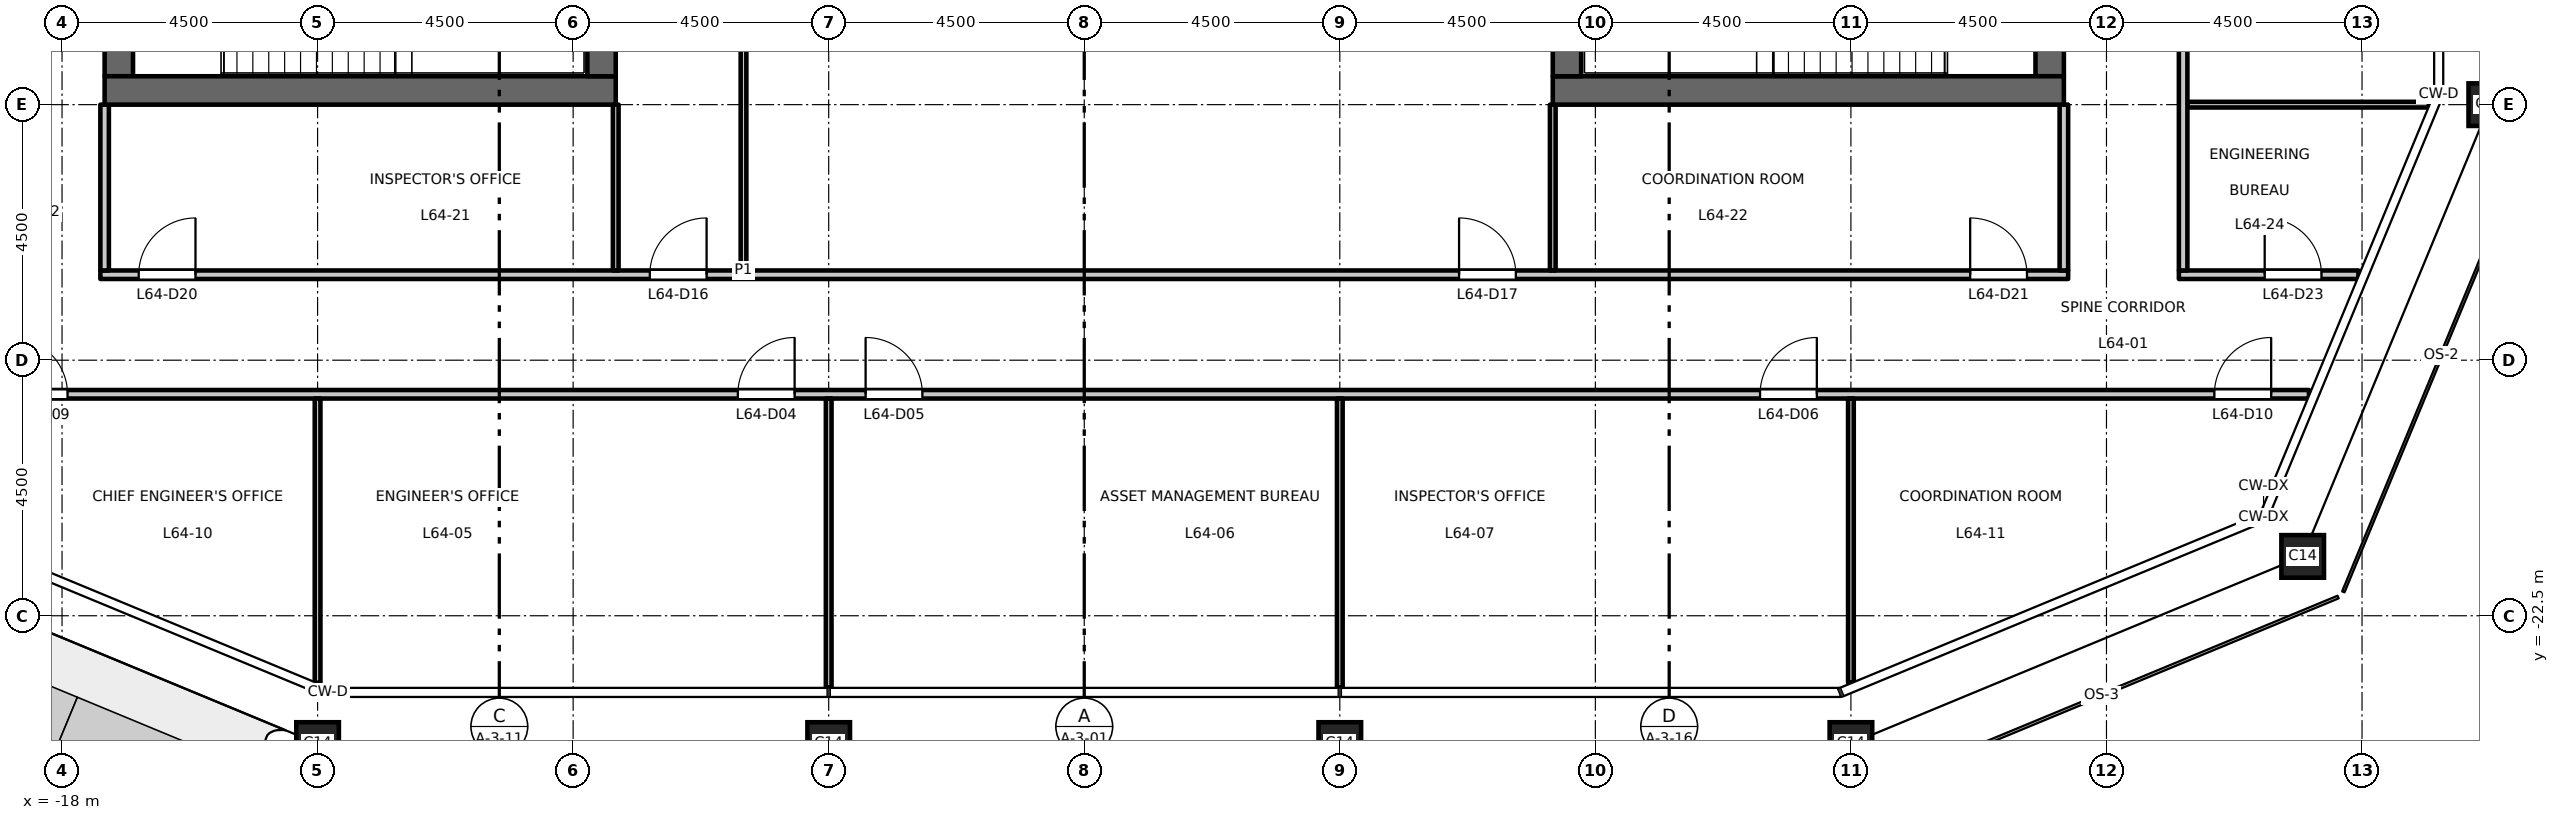
"""IFC4 building model, lengths in metres.
Left out: names, types, materials, properties, quantities, classifications, styles, units other than length and angle.
Written with IfcOpenShell. Run it as: python <this file> out.ifc"""

import sys

from ifc_helpers import new_model, si_unit, direction, frame, frame_2d, origin, origin_2d, place, context, subcontext, project, spatial, rectangle, hollow_rectangle, extrude, element, fill, save


model = new_model("IFC4")
c1 = context("Model", 3, precision=1e-05, world=origin(), true_north=direction((0.0, 1.0)))
c2 = subcontext(c1, "Body", "Model", "MODEL_VIEW")
j1 = project(units=[si_unit("LENGTHUNIT", "METRE"), si_unit("PLANEANGLEUNIT", "RADIAN")], contexts=[c1])
p1 = place(None, origin())
s1 = spatial("IfcSite", under=j1, at=p1, CompositionType="ELEMENT")
p2 = place(p1, origin())
s2 = spatial("IfcBuilding", under=s1, at=p2, CompositionType="ELEMENT")
p3 = place(p2, frame((0.0, 0.0, 298.7)))
s3 = spatial("IfcBuildingStorey", under=s2, at=p3, CompositionType="ELEMENT", Elevation=298.7)
for number, where, z_axis, x_axis in (
    (1, (-13.5, -24.75, 0.0), (0.0, 0.0, 1.0), (1.0, 0.0, 0.0)),
    (2, (-4.5, -24.75, 0.0), (0.0, 0.0, 1.0), (1.0, 0.0, 0.0)),
    (3, (4.5, -24.75, 0.0), (0.0, 0.0, 1.0), (1.0, 0.0, 0.0)),
    (4, (13.5, -24.75, 0.0), (0.0, 0.0, 1.0), (1.0, 0.0, 0.0)),
    (5, (21.455, -21.455, 0.0), (0.0, 0.0, 1.0), (1.0, 0.0, 0.0)),
    (6, (24.75, -13.5, 0.0), (0.0, 0.0, 1.0), (1.0, 0.0, 0.0)),
):
    element("IfcColumn", number, at=place(p3, frame(where, z_axis=z_axis, x_axis=x_axis)), inside=s3, PredefinedType="COLUMN", context=c2, shape_type="SweptSolid", body=[
        extrude(hollow_rectangle(XDim=0.75, YDim=0.75, WallThickness=0.04, at=origin_2d()), origin(), (0.0, 0.0, 1.0), 4.5),
    ])
p4 = place(p3, frame((-17.0, -13.0, 0.0), z_axis=(0.0, 0.0, 1.0), x_axis=(0.0, 1.0, 0.0)))
e7 = element("IfcWall", 7, at=p4, inside=s3, PredefinedType="SHEAR", context=c2, shape_type="SweptSolid", body=[
    extrude(rectangle(XDim=26.0, YDim=0.5, at=frame_2d((13.0, 0.0))), origin(), (0.0, 0.0, 1.0), 4.35),
])
p5 = place(p4, frame((16.825, 0.0, 0.0)))
e8 = element("IfcOpeningElement", 8, at=p5, cuts=e7, PredefinedType="OPENING", context=c2, shape_type="SweptSolid", body=[
    extrude(rectangle(XDim=1.8, YDim=2.1, at=frame_2d((0.9, 1.05))), frame((0.0, 0.26, 0.0), z_axis=(0.0, -1.0, 0.0), x_axis=(1.0, 0.0, 0.0)), (0.0, 0.0, 1.0), 0.52),
])
p6 = place(p4, frame((7.375, 0.0, 0.0)))
e9 = element("IfcOpeningElement", 9, at=p6, cuts=e7, PredefinedType="OPENING", context=c2, shape_type="SweptSolid", body=[
    extrude(rectangle(XDim=1.8, YDim=2.1, at=frame_2d((0.9, 1.05))), frame((0.0, 0.26, 0.0), z_axis=(0.0, -1.0, 0.0), x_axis=(1.0, 0.0, 0.0)), (0.0, 0.0, 1.0), 0.52),
])
p7 = place(p3, frame((-8.25, -13.25, 0.0), z_axis=(0.0, 0.0, 1.0), x_axis=(-1.0, 0.0, 0.0)))
e10 = element("IfcWall", 10, at=p7, inside=s3, PredefinedType="SHEAR", context=c2, shape_type="SweptSolid", body=[
    extrude(rectangle(XDim=9.0, YDim=0.5, at=frame_2d((4.5, 0.0))), origin(), (0.0, 0.0, 1.0), 4.35),
])
p8 = place(p3, frame((-8.5, -13.0, 0.0), z_axis=(0.0, 0.0, 1.0), x_axis=(0.0, 1.0, 0.0)))
e11 = element("IfcWall", 11, at=p8, inside=s3, PredefinedType="SHEAR", context=c2, shape_type="SweptSolid", body=[
    extrude(rectangle(XDim=26.0, YDim=0.5, at=frame_2d((13.0, 0.0))), origin(), (0.0, 0.0, 1.0), 4.35),
])
p9 = place(p3, frame((17.0, -13.0, 0.0), z_axis=(0.0, 0.0, 1.0), x_axis=(0.0, 1.0, 0.0)))
e12 = element("IfcWall", 12, at=p9, inside=s3, PredefinedType="SHEAR", context=c2, shape_type="SweptSolid", body=[
    extrude(rectangle(XDim=26.0, YDim=0.5, at=frame_2d((13.0, 0.0))), origin(), (0.0, 0.0, 1.0), 4.35),
])
p10 = place(p9, frame((16.825, 0.0, 0.0)))
e13 = element("IfcOpeningElement", 13, at=p10, cuts=e12, PredefinedType="OPENING", context=c2, shape_type="SweptSolid", body=[
    extrude(rectangle(XDim=1.8, YDim=2.1, at=frame_2d((0.9, 1.05))), frame((0.0, 0.26, 0.0), z_axis=(0.0, -1.0, 0.0), x_axis=(1.0, 0.0, 0.0)), (0.0, 0.0, 1.0), 0.52),
])
p11 = place(p9, frame((7.375, 0.0, 0.0)))
e14 = element("IfcOpeningElement", 14, at=p11, cuts=e12, PredefinedType="OPENING", context=c2, shape_type="SweptSolid", body=[
    extrude(rectangle(XDim=1.8, YDim=2.1, at=frame_2d((0.9, 1.05))), frame((0.0, 0.26, 0.0), z_axis=(0.0, -1.0, 0.0), x_axis=(1.0, 0.0, 0.0)), (0.0, 0.0, 1.0), 0.52),
])
p12 = place(p3, frame((8.25, -13.25, 0.0), z_axis=(0.0, 0.0, 1.0), x_axis=(1.0, 0.0, 0.0)))
e15 = element("IfcWall", 15, at=p12, inside=s3, PredefinedType="SHEAR", context=c2, shape_type="SweptSolid", body=[
    extrude(rectangle(XDim=9.0, YDim=0.5, at=frame_2d((4.5, 0.0))), origin(), (0.0, 0.0, 1.0), 4.35),
])
p13 = place(p3, frame((8.5, -13.0, 0.0), z_axis=(0.0, 0.0, 1.0), x_axis=(0.0, 1.0, 0.0)))
e16 = element("IfcWall", 16, at=p13, inside=s3, PredefinedType="SHEAR", context=c2, shape_type="SweptSolid", body=[
    extrude(rectangle(XDim=26.0, YDim=0.5, at=frame_2d((13.0, 0.0))), origin(), (0.0, 0.0, 1.0), 4.35),
])
p14 = place(p3, frame((-19.628, -18.6, 0.0), z_axis=(0.0, 0.0, 1.0), x_axis=(1.0, 0.0, 0.0)))
e17 = element("IfcWall", 17, at=p14, inside=s3, PredefinedType="PARTITIONING", context=c2, shape_type="SweptSolid", body=[
    extrude(rectangle(XDim=41.194, YDim=0.15, at=frame_2d((20.597, 0.0))), origin(), (0.0, 0.0, 1.0), 4.35),
])
p15 = place(p14, frame((13.528, 0.0, 0.0)))
e18 = element("IfcOpeningElement", 18, at=p15, cuts=e17, PredefinedType="OPENING", context=c2, shape_type="SweptSolid", body=[
    extrude(rectangle(XDim=1.0, YDim=2.1, at=frame_2d((0.5, 1.05))), frame((0.0, 0.085, 0.0), z_axis=(0.0, -1.0, 0.0), x_axis=(1.0, 0.0, 0.0)), (0.0, 0.0, 1.0), 0.17),
])
p16 = place(p14, frame((15.778, 0.0, 0.0)))
e19 = element("IfcOpeningElement", 19, at=p16, cuts=e17, PredefinedType="OPENING", context=c2, shape_type="SweptSolid", body=[
    extrude(rectangle(XDim=1.0, YDim=2.1, at=frame_2d((0.5, 1.05))), frame((0.0, 0.085, 0.0), z_axis=(0.0, -1.0, 0.0), x_axis=(1.0, 0.0, 0.0)), (0.0, 0.0, 1.0), 0.17),
])
p17 = place(p14, frame((31.528, 0.0, 0.0)))
e20 = element("IfcOpeningElement", 20, at=p17, cuts=e17, PredefinedType="OPENING", context=c2, shape_type="SweptSolid", body=[
    extrude(rectangle(XDim=1.0, YDim=2.1, at=frame_2d((0.5, 1.05))), frame((0.0, 0.085, 0.0), z_axis=(0.0, -1.0, 0.0), x_axis=(1.0, 0.0, 0.0)), (0.0, 0.0, 1.0), 0.17),
])
p18 = place(p14, frame((0.725, 0.0, 0.0)))
e21 = element("IfcOpeningElement", 21, at=p18, cuts=e17, PredefinedType="OPENING", context=c2, shape_type="SweptSolid", body=[
    extrude(rectangle(XDim=1.0, YDim=2.1, at=frame_2d((0.5, 1.05))), frame((0.0, 0.085, 0.0), z_axis=(0.0, -1.0, 0.0), x_axis=(1.0, 0.0, 0.0)), (0.0, 0.0, 1.0), 0.17),
])
p19 = place(p14, frame((39.528, 0.0, 0.0)))
e22 = element("IfcOpeningElement", 22, at=p19, cuts=e17, PredefinedType="OPENING", context=c2, shape_type="SweptSolid", body=[
    extrude(rectangle(XDim=1.0, YDim=2.1, at=frame_2d((0.5, 1.05))), frame((0.0, 0.085, 0.0), z_axis=(0.0, -1.0, 0.0), x_axis=(1.0, 0.0, 0.0)), (0.0, 0.0, 1.0), 0.17),
])
p20 = place(p3, frame((-17.325, -16.495, 0.0), z_axis=(0.0, 0.0, 1.0), x_axis=(1.0, 0.0, 0.0)))
e23 = element("IfcWall", 23, at=p20, inside=s3, PredefinedType="PARTITIONING", context=c2, shape_type="SweptSolid", body=[
    extrude(rectangle(XDim=34.65, YDim=0.15, at=frame_2d((17.325, 0.0))), origin(), (0.0, 0.0, 1.0), 4.35),
])
p21 = place(p20, frame((9.675, 0.0, 0.0)))
e24 = element("IfcOpeningElement", 24, at=p21, cuts=e23, PredefinedType="OPENING", context=c2, shape_type="SweptSolid", body=[
    extrude(rectangle(XDim=1.0, YDim=2.1, at=frame_2d((0.5, 1.05))), frame((0.0, 0.085, 0.0), z_axis=(0.0, -1.0, 0.0), x_axis=(1.0, 0.0, 0.0)), (0.0, 0.0, 1.0), 0.17),
])
p22 = place(p20, frame((23.925, 0.0, 0.0)))
e25 = element("IfcOpeningElement", 25, at=p22, cuts=e23, PredefinedType="OPENING", context=c2, shape_type="SweptSolid", body=[
    extrude(rectangle(XDim=1.0, YDim=2.1, at=frame_2d((0.5, 1.05))), frame((0.0, 0.085, 0.0), z_axis=(0.0, -1.0, 0.0), x_axis=(1.0, 0.0, 0.0)), (0.0, 0.0, 1.0), 0.17),
])
p23 = place(p20, frame((0.675, 0.0, 0.0)))
e26 = element("IfcOpeningElement", 26, at=p23, cuts=e23, PredefinedType="OPENING", context=c2, shape_type="SweptSolid", body=[
    extrude(rectangle(XDim=1.0, YDim=2.1, at=frame_2d((0.5, 1.05))), frame((0.0, 0.085, 0.0), z_axis=(0.0, -1.0, 0.0), x_axis=(1.0, 0.0, 0.0)), (0.0, 0.0, 1.0), 0.17),
])
p24 = place(p20, frame((32.925, 0.0, 0.0)))
e27 = element("IfcOpeningElement", 27, at=p24, cuts=e23, PredefinedType="OPENING", context=c2, shape_type="SweptSolid", body=[
    extrude(rectangle(XDim=1.0, YDim=2.1, at=frame_2d((0.5, 1.05))), frame((0.0, 0.085, 0.0), z_axis=(0.0, -1.0, 0.0), x_axis=(1.0, 0.0, 0.0)), (0.0, 0.0, 1.0), 0.17),
])
p25 = place(p3, frame((19.275, -16.495, 0.0), z_axis=(0.0, 0.0, 1.0), x_axis=(1.0, 0.0, 0.0)))
e28 = element("IfcWall", 28, at=p25, inside=s3, PredefinedType="PARTITIONING", context=c2, shape_type="SweptSolid", body=[
    extrude(rectangle(XDim=3.161, YDim=0.15, at=frame_2d((1.581, 0.0))), origin(), (0.0, 0.0, 1.0), 4.35),
])
p26 = place(p25, frame((1.511, 0.0, 0.0)))
e29 = element("IfcOpeningElement", 29, at=p26, cuts=e28, PredefinedType="OPENING", context=c2, shape_type="SweptSolid", body=[
    extrude(rectangle(XDim=1.0, YDim=2.1, at=frame_2d((0.5, 1.05))), frame((0.0, 0.085, 0.0), z_axis=(0.0, -1.0, 0.0), x_axis=(1.0, 0.0, 0.0)), (0.0, 0.0, 1.0), 0.17),
])
p27 = place(p3, frame((19.425, -13.5, 0.0), z_axis=(0.0, 0.0, 1.0), x_axis=(1.0, 0.0, 0.0)))
e30 = element("IfcWall", 30, at=p27, inside=s3, PredefinedType="PARTITIONING", context=c2, shape_type="SweptSolid", body=[
    extrude(rectangle(XDim=4.253, YDim=0.1, at=frame_2d((2.126, 0.0))), origin(), (0.0, 0.0, 1.0), 4.35),
])
p28 = place(p3, frame((-17.25, -16.42, 0.0), z_axis=(0.0, 0.0, 1.0), x_axis=(0.0, 1.0, 0.0)))
e31 = element("IfcWall", 31, at=p28, inside=s3, PredefinedType="PARTITIONING", context=c2, shape_type="SweptSolid", body=[
    extrude(rectangle(XDim=2.92, YDim=0.15, at=frame_2d((1.46, 0.0))), origin(), (0.0, 0.0, 1.0), 4.35),
])
p29 = place(p3, frame((-13.5, -23.678, 0.0), z_axis=(0.0, 0.0, 1.0), x_axis=(0.0, 1.0, 0.0)))
e32 = element("IfcWall", 32, at=p29, inside=s3, PredefinedType="PARTITIONING", context=c2, shape_type="SweptSolid", body=[
    extrude(rectangle(XDim=5.003, YDim=0.1, at=frame_2d((2.501, 0.0))), origin(), (0.0, 0.0, 1.0), 3.75),
])
p30 = place(p3, frame((-8.25, -16.42, 0.0), z_axis=(0.0, 0.0, 1.0), x_axis=(0.0, 1.0, 0.0)))
e33 = element("IfcWall", 33, at=p30, inside=s3, PredefinedType="PARTITIONING", context=c2, shape_type="SweptSolid", body=[
    extrude(rectangle(XDim=2.92, YDim=0.1, at=frame_2d((1.46, 0.0))), origin(), (0.0, 0.0, 1.0), 4.35),
])
p31 = place(p3, frame((-6.0, -16.42, 0.0), z_axis=(0.0, 0.0, 1.0), x_axis=(0.0, 1.0, 0.0)))
e34 = element("IfcWall", 34, at=p31, inside=s3, PredefinedType="PARTITIONING", context=c2, shape_type="SweptSolid", body=[
    extrude(rectangle(XDim=7.87, YDim=0.1, at=frame_2d((3.935, 0.0))), origin(), (0.0, 0.0, 1.0), 4.35),
])
for number, where, z_axis, x_axis in (
    (35, (-4.5, -23.76, 0.0), (0.0, 0.0, 1.0), (0.0, 1.0, 0.0)),
    (36, (4.5, -23.76, 0.0), (0.0, 0.0, 1.0), (0.0, 1.0, 0.0)),
):
    element("IfcWall", number, at=place(p3, frame(where, z_axis=z_axis, x_axis=x_axis)), inside=s3, PredefinedType="PARTITIONING", context=c2, shape_type="SweptSolid", body=[
        extrude(rectangle(XDim=5.085, YDim=0.1, at=frame_2d((2.542, 0.0))), origin(), (0.0, 0.0, 1.0), 3.65),
    ])
p32 = place(p3, frame((8.25, -16.42, 0.0), z_axis=(0.0, 0.0, 1.0), x_axis=(0.0, 1.0, 0.0)))
e37 = element("IfcWall", 37, at=p32, inside=s3, PredefinedType="PARTITIONING", context=c2, shape_type="SweptSolid", body=[
    extrude(rectangle(XDim=2.92, YDim=0.1, at=frame_2d((1.46, 0.0))), origin(), (0.0, 0.0, 1.0), 4.35),
])
p33 = place(p3, frame((13.5, -23.678, 0.0), z_axis=(0.0, 0.0, 1.0), x_axis=(0.0, 1.0, 0.0)))
e38 = element("IfcWall", 38, at=p33, inside=s3, PredefinedType="PARTITIONING", context=c2, shape_type="SweptSolid", body=[
    extrude(rectangle(XDim=5.003, YDim=0.1, at=frame_2d((2.501, 0.0))), origin(), (0.0, 0.0, 1.0), 3.75),
])
p34 = place(p3, frame((17.25, -16.42, 0.0), z_axis=(0.0, 0.0, 1.0), x_axis=(0.0, 1.0, 0.0)))
e39 = element("IfcWall", 39, at=p34, inside=s3, PredefinedType="PARTITIONING", context=c2, shape_type="SweptSolid", body=[
    extrude(rectangle(XDim=2.92, YDim=0.15, at=frame_2d((1.46, 0.0))), origin(), (0.0, 0.0, 1.0), 4.35),
])
p35 = place(p3, frame((19.35, -16.42, 0.0), z_axis=(0.0, 0.0, 1.0), x_axis=(0.0, 1.0, 0.0)))
e40 = element("IfcWall", 40, at=p35, inside=s3, PredefinedType="PARTITIONING", context=c2, shape_type="SweptSolid", body=[
    extrude(rectangle(XDim=32.845, YDim=0.15, at=frame_2d((16.422, 0.0))), origin(), (0.0, 0.0, 1.0), 4.35),
])
p36 = place(p35, frame((10.32, 0.0, 0.0)))
e41 = element("IfcOpeningElement", 41, at=p36, cuts=e40, PredefinedType="OPENING", context=c2, shape_type="SweptSolid", body=[
    extrude(rectangle(XDim=1.0, YDim=2.1, at=frame_2d((0.5, 1.05))), frame((0.0, 0.085, 0.0), z_axis=(0.0, -1.0, 0.0), x_axis=(1.0, 0.0, 0.0)), (0.0, 0.0, 1.0), 0.17),
])
p37 = place(p35, frame((12.57, 0.0, 0.0)))
e42 = element("IfcOpeningElement", 42, at=p37, cuts=e40, PredefinedType="OPENING", context=c2, shape_type="SweptSolid", body=[
    extrude(rectangle(XDim=1.0, YDim=2.1, at=frame_2d((0.5, 1.05))), frame((0.0, 0.085, 0.0), z_axis=(0.0, -1.0, 0.0), x_axis=(1.0, 0.0, 0.0)), (0.0, 0.0, 1.0), 0.17),
])
p38 = place(p35, frame((28.32, 0.0, 0.0)))
e43 = element("IfcOpeningElement", 43, at=p38, cuts=e40, PredefinedType="OPENING", context=c2, shape_type="SweptSolid", body=[
    extrude(rectangle(XDim=1.0, YDim=2.1, at=frame_2d((0.5, 1.05))), frame((0.0, 0.085, 0.0), z_axis=(0.0, -1.0, 0.0), x_axis=(1.0, 0.0, 0.0)), (0.0, 0.0, 1.0), 0.17),
])
p39 = place(p15, origin())
e44 = element("IfcDoor", 44, at=p39, inside=s3, OperationType="SINGLE_SWING_RIGHT", PredefinedType="DOOR", context=c2, shape_type="SweptSolid", body=[
    extrude(rectangle(XDim=1.0, YDim=2.1, at=frame_2d((0.5, 1.05))), frame((0.0, 0.025, 0.0), z_axis=(0.0, -1.0, 0.0), x_axis=(1.0, 0.0, 0.0)), (0.0, 0.0, 1.0), 0.05),
])
fill(e18, e44)
p40 = place(p16, origin())
e45 = element("IfcDoor", 45, at=p40, inside=s3, OperationType="SINGLE_SWING_LEFT", PredefinedType="DOOR", context=c2, shape_type="SweptSolid", body=[
    extrude(rectangle(XDim=1.0, YDim=2.1, at=frame_2d((0.5, 1.05))), frame((0.0, 0.025, 0.0), z_axis=(0.0, -1.0, 0.0), x_axis=(1.0, 0.0, 0.0)), (0.0, 0.0, 1.0), 0.05),
])
fill(e19, e45)
p41 = place(p17, origin())
e46 = element("IfcDoor", 46, at=p41, inside=s3, OperationType="SINGLE_SWING_RIGHT", PredefinedType="DOOR", context=c2, shape_type="SweptSolid", body=[
    extrude(rectangle(XDim=1.0, YDim=2.1, at=frame_2d((0.5, 1.05))), frame((0.0, 0.025, 0.0), z_axis=(0.0, -1.0, 0.0), x_axis=(1.0, 0.0, 0.0)), (0.0, 0.0, 1.0), 0.05),
])
fill(e20, e46)
p42 = place(p18, origin())
e47 = element("IfcDoor", 47, at=p42, inside=s3, OperationType="SINGLE_SWING_LEFT", PredefinedType="DOOR", context=c2, shape_type="SweptSolid", body=[
    extrude(rectangle(XDim=1.0, YDim=2.1, at=frame_2d((0.5, 1.05))), frame((0.0, 0.025, 0.0), z_axis=(0.0, -1.0, 0.0), x_axis=(1.0, 0.0, 0.0)), (0.0, 0.0, 1.0), 0.05),
])
fill(e21, e47)
p43 = place(p19, origin())
e48 = element("IfcDoor", 48, at=p43, inside=s3, OperationType="SINGLE_SWING_RIGHT", PredefinedType="DOOR", context=c2, shape_type="SweptSolid", body=[
    extrude(rectangle(XDim=1.0, YDim=2.1, at=frame_2d((0.5, 1.05))), frame((0.0, 0.025, 0.0), z_axis=(0.0, -1.0, 0.0), x_axis=(1.0, 0.0, 0.0)), (0.0, 0.0, 1.0), 0.05),
])
fill(e22, e48)
p44 = place(p21, origin())
e49 = element("IfcDoor", 49, at=p44, inside=s3, OperationType="SINGLE_SWING_RIGHT", PredefinedType="DOOR", context=c2, shape_type="SweptSolid", body=[
    extrude(rectangle(XDim=1.0, YDim=2.1, at=frame_2d((0.5, 1.05))), frame((0.0, 0.025, 0.0), z_axis=(0.0, -1.0, 0.0), x_axis=(1.0, 0.0, 0.0)), (0.0, 0.0, 1.0), 0.05),
])
fill(e24, e49)
p45 = place(p22, origin())
e50 = element("IfcDoor", 50, at=p45, inside=s3, OperationType="SINGLE_SWING_LEFT", PredefinedType="DOOR", context=c2, shape_type="SweptSolid", body=[
    extrude(rectangle(XDim=1.0, YDim=2.1, at=frame_2d((0.5, 1.05))), frame((0.0, 0.025, 0.0), z_axis=(0.0, -1.0, 0.0), x_axis=(1.0, 0.0, 0.0)), (0.0, 0.0, 1.0), 0.05),
])
fill(e25, e50)
p46 = place(p23, origin())
e51 = element("IfcDoor", 51, at=p46, inside=s3, OperationType="SINGLE_SWING_RIGHT", PredefinedType="DOOR", context=c2, shape_type="SweptSolid", body=[
    extrude(rectangle(XDim=1.0, YDim=2.1, at=frame_2d((0.5, 1.05))), frame((0.0, 0.025, 0.0), z_axis=(0.0, -1.0, 0.0), x_axis=(1.0, 0.0, 0.0)), (0.0, 0.0, 1.0), 0.05),
])
fill(e26, e51)
p47 = place(p24, origin())
e52 = element("IfcDoor", 52, at=p47, inside=s3, OperationType="SINGLE_SWING_LEFT", PredefinedType="DOOR", context=c2, shape_type="SweptSolid", body=[
    extrude(rectangle(XDim=1.0, YDim=2.1, at=frame_2d((0.5, 1.05))), frame((0.0, 0.025, 0.0), z_axis=(0.0, -1.0, 0.0), x_axis=(1.0, 0.0, 0.0)), (0.0, 0.0, 1.0), 0.05),
])
fill(e27, e52)
p48 = place(p26, origin())
e53 = element("IfcDoor", 53, at=p48, inside=s3, OperationType="SINGLE_SWING_LEFT", PredefinedType="DOOR", context=c2, shape_type="SweptSolid", body=[
    extrude(rectangle(XDim=1.0, YDim=2.1, at=frame_2d((0.5, 1.05))), frame((0.0, 0.025, 0.0), z_axis=(0.0, -1.0, 0.0), x_axis=(1.0, 0.0, 0.0)), (0.0, 0.0, 1.0), 0.05),
])
fill(e29, e53)
save(model, sys.argv[1])
